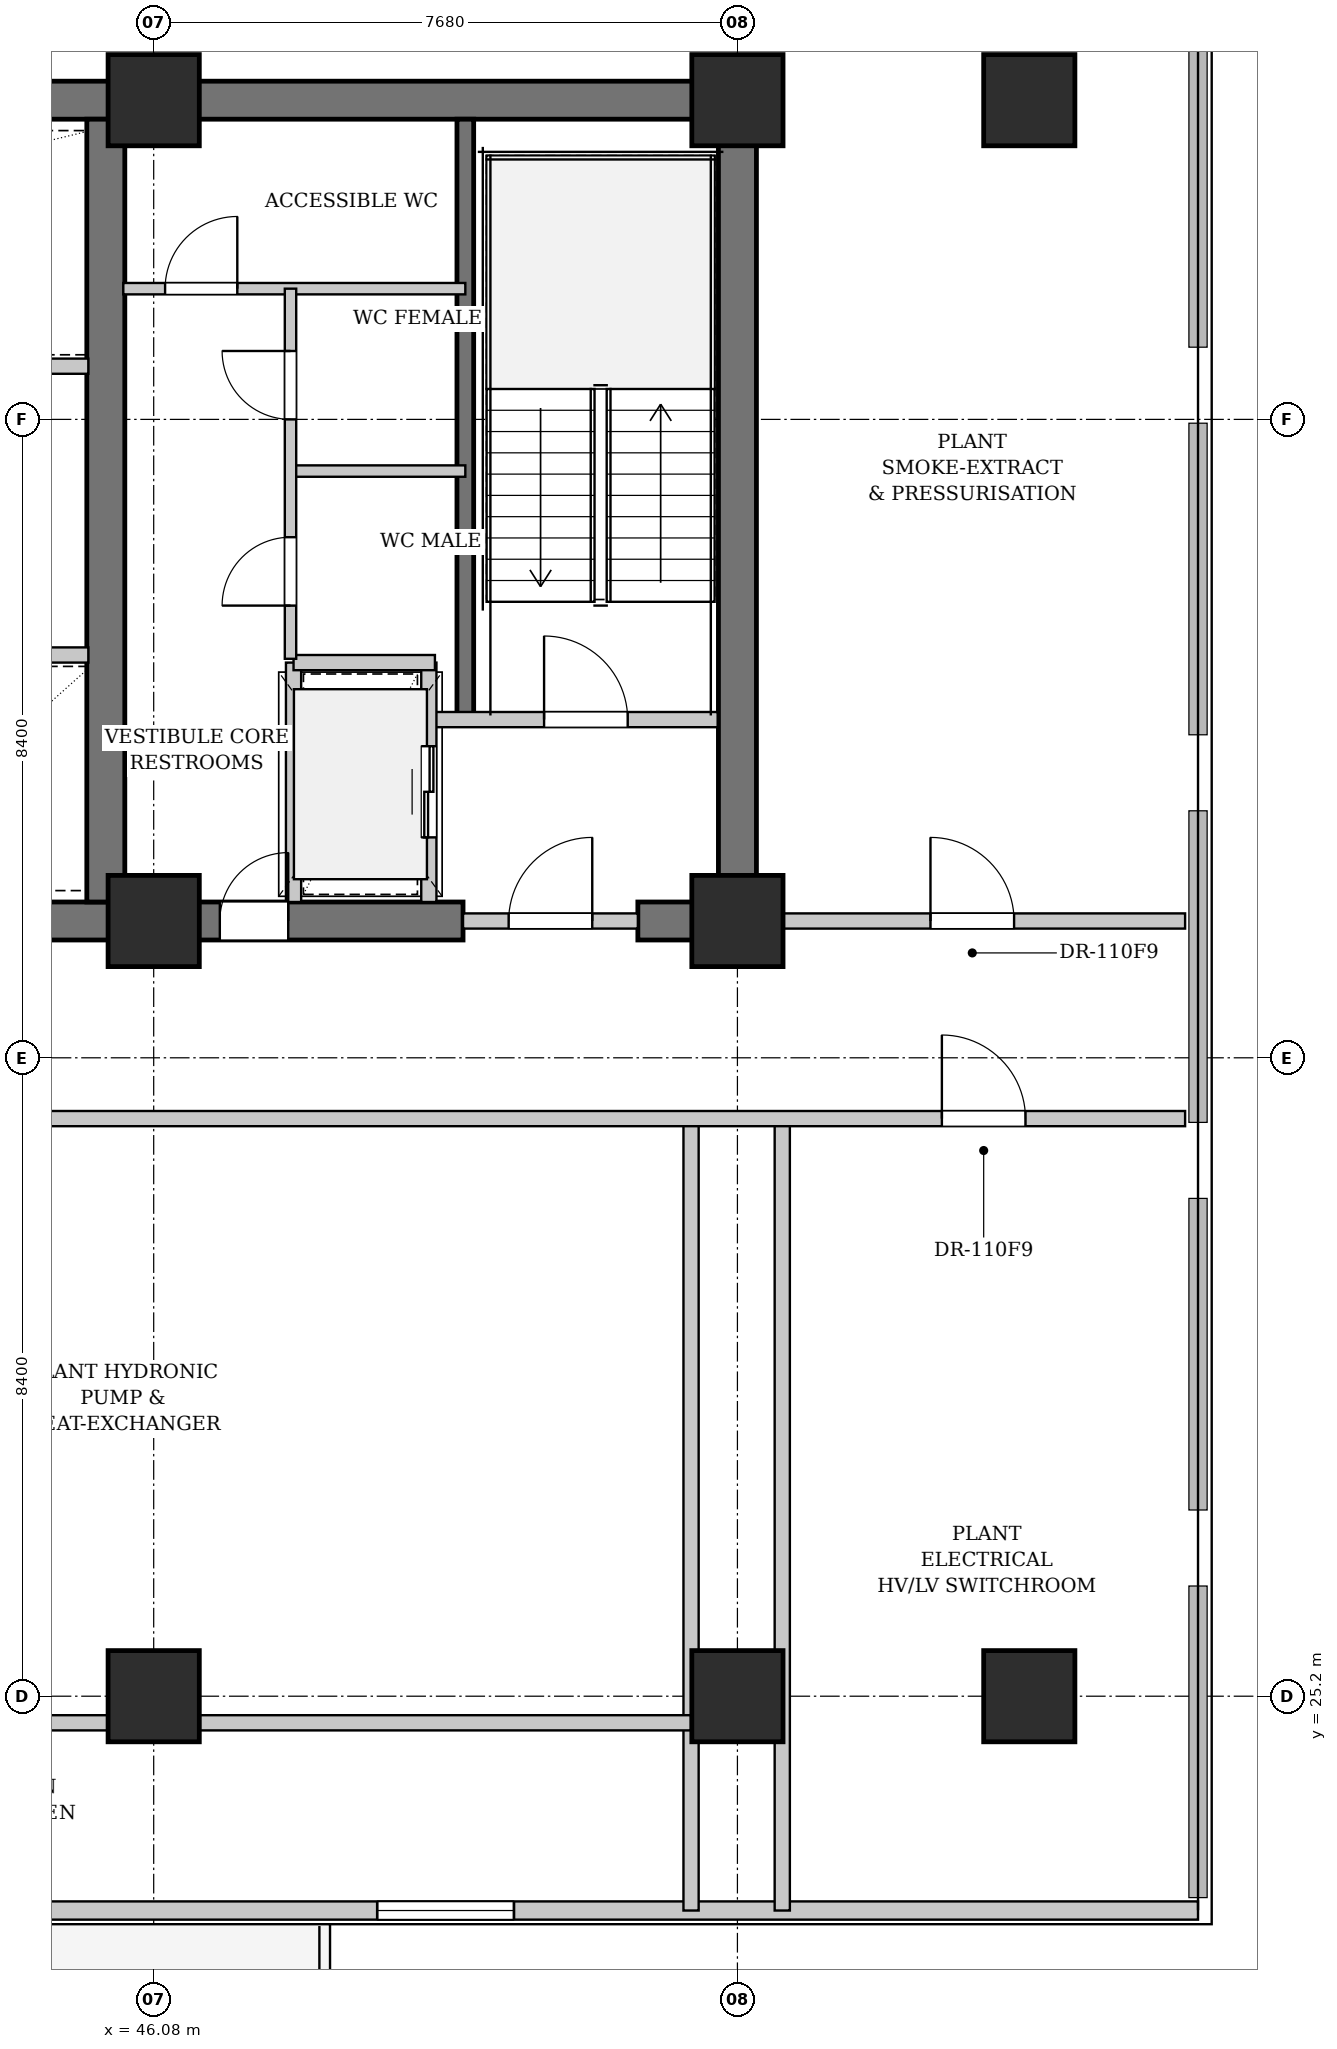
"""IFC4 building model, lengths in metres.
Left out: names, types, materials, properties, quantities, classifications, styles, units other than length and angle.
Written with IfcOpenShell. Run it as: python <this file> out.ifc"""

import sys

from ifc_helpers import new_model, si_unit, direction, frame, frame_2d, origin, origin_2d, place, context, subcontext, project, spatial, rectangle, extrude, element, fill, save


model = new_model("IFC4")
c1 = context("Model", 3, precision=1e-05, world=origin(), true_north=direction((0.0, 1.0)))
c2 = subcontext(c1, "Body", "Model", "MODEL_VIEW")
j1 = project(units=[si_unit("LENGTHUNIT", "METRE"), si_unit("PLANEANGLEUNIT", "RADIAN")], contexts=[c1])
p1 = place(None, origin())
s1 = spatial("IfcSite", under=j1, at=p1, CompositionType="ELEMENT")
p2 = place(p1, origin())
s2 = spatial("IfcBuilding", under=s1, at=p2, CompositionType="ELEMENT")
p3 = place(p2, frame((0.0, 0.0, 78.0)))
s3 = spatial("IfcBuildingStorey", under=s2, at=p3, CompositionType="ELEMENT", Elevation=78.0)
p4 = place(p3, frame((22.79, 46.2, 0.0), z_axis=(0.0, 0.0, 1.0), x_axis=(1.0, 0.0, 0.0)))
e1 = element("IfcWall", 1, at=p4, inside=s3, PredefinedType="SHEAR", context=c2, shape_type="SweptSolid", body=[
    extrude(rectangle(XDim=31.22, YDim=0.5, at=frame_2d((15.61, 0.0))), origin(), (0.0, 0.0, 1.0), 3.68),
])
p5 = place(p3, frame((42.1, 35.4, 0.0), z_axis=(0.0, 0.0, 1.0), x_axis=(1.0, 0.0, 0.0)))
e2 = element("IfcWall", 2, at=p5, inside=s3, PredefinedType="SHEAR", context=c2, shape_type="SweptSolid", body=[
    extrude(rectangle(XDim=8.05, YDim=0.5, at=frame_2d((4.025, 0.0))), origin(), (0.0, 0.0, 1.0), 3.68),
])
p6 = place(p5, frame((4.85, 0.0, 0.0)))
e3 = element("IfcOpeningElement", 3, at=p6, cuts=e2, PredefinedType="OPENING", context=c2, shape_type="SweptSolid", body=[
    extrude(rectangle(XDim=0.9, YDim=2.15, at=frame_2d((0.45, 1.075))), frame((0.0, 0.26, 0.0), z_axis=(0.0, -1.0, 0.0), x_axis=(1.0, 0.0, 0.0)), (0.0, 0.0, 1.0), 0.52),
])
p7 = place(p3, frame((52.45, 35.4, 0.0), z_axis=(0.0, 0.0, 1.0), x_axis=(1.0, 0.0, 0.0)))
e4 = element("IfcWall", 4, at=p7, inside=s3, PredefinedType="SHEAR", context=c2, shape_type="SweptSolid", body=[
    extrude(rectangle(XDim=1.56, YDim=0.5, at=frame_2d((0.78, 0.0))), origin(), (0.0, 0.0, 1.0), 3.68),
])
for number, where, z_axis, x_axis in (
    (5, (45.45, 35.65, 0.0), (0.0, 0.0, 1.0), (0.0, 1.0, 0.0)),
    (6, (53.76, 35.65, 0.0), (0.0, 0.0, 1.0), (0.0, 1.0, 0.0)),
):
    element("IfcWall", number, at=place(p3, frame(where, z_axis=z_axis, x_axis=x_axis)), inside=s3, PredefinedType="SHEAR", context=c2, shape_type="SweptSolid", body=[
        extrude(rectangle(XDim=10.3, YDim=0.5, at=frame_2d((5.15, 0.0))), origin(), (0.0, 0.0, 1.0), 3.68),
    ])
p8 = place(p3, frame((50.18, 38.05, 0.0), z_axis=(0.0, 0.0, 1.0), x_axis=(0.0, 1.0, 0.0)))
e7 = element("IfcWall", 7, at=p8, inside=s3, PredefinedType="SHEAR", context=c2, shape_type="SweptSolid", body=[
    extrude(rectangle(XDim=7.9, YDim=0.22, at=frame_2d((3.95, 0.0))), origin(), (0.0, 0.0, 1.0), 3.68),
])
for number, where, z_axis, x_axis in (
    (8, (46.08, 35.4, 0.0), (0.0, 0.0, 1.0), (1.0, 0.0, 0.0)),
    (9, (46.08, 46.2, 0.0), (0.0, 0.0, 1.0), (1.0, 0.0, 0.0)),
    (10, (46.08, 25.2, 0.0), (0.0, 0.0, 1.0), (1.0, 0.0, 0.0)),
    (11, (53.76, 35.4, 0.0), (0.0, 0.0, 1.0), (1.0, 0.0, 0.0)),
    (12, (53.76, 46.2, 0.0), (0.0, 0.0, 1.0), (1.0, 0.0, 0.0)),
    (13, (53.76, 25.2, 0.0), (0.0, 0.0, 1.0), (1.0, 0.0, 0.0)),
    (14, (57.6, 25.2, 0.0), (0.0, 0.0, 1.0), (1.0, 0.0, 0.0)),
    (15, (57.6, 46.2, 0.0), (0.0, 0.0, 1.0), (1.0, 0.0, 0.0)),
):
    element("IfcColumn", number, at=place(p3, frame(where, z_axis=z_axis, x_axis=x_axis)), inside=s3, PredefinedType="COLUMN", context=c2, shape_type="SweptSolid", body=[
        extrude(rectangle(XDim=1.2, YDim=1.2, at=origin_2d()), origin(), (0.0, 0.0, 1.0), 3.9),
    ])
p9 = place(p3, frame((16.98, 22.38, 0.0), z_axis=(0.0, 0.0, 1.0), x_axis=(1.0, 0.0, 0.0)))
e16 = element("IfcWall", 16, at=p9, inside=s3, PredefinedType="SOLIDWALL", context=c2, shape_type="SweptSolid", body=[
    extrude(rectangle(XDim=42.84, YDim=0.24, at=frame_2d((21.42, 0.0))), origin(), (0.0, 0.0, 1.0), 3.68),
])
p10 = place(p9, frame((16.78, 0.0, 0.0)))
e17 = element("IfcOpeningElement", 17, at=p10, cuts=e16, PredefinedType="OPENING", context=c2, shape_type="SweptSolid", body=[
    extrude(rectangle(XDim=1.6, YDim=2.25, at=frame_2d((0.8, 1.125))), frame((0.0, 0.13, 0.0), z_axis=(0.0, -1.0, 0.0), x_axis=(1.0, 0.0, 0.0)), (0.0, 0.0, 1.0), 0.26),
])
p11 = place(p9, frame((9.0, 0.0, 0.9)))
e18 = element("IfcOpeningElement", 18, at=p11, cuts=e16, PredefinedType="OPENING", context=c2, shape_type="SweptSolid", body=[
    extrude(rectangle(XDim=1.8, YDim=2.0, at=frame_2d((0.9, 1.0))), frame((0.0, 0.13, 0.0), z_axis=(0.0, -1.0, 0.0), x_axis=(1.0, 0.0, 0.0)), (0.0, 0.0, 1.0), 0.26),
])
p12 = place(p9, frame((32.04, 0.0, 0.9)))
e19 = element("IfcOpeningElement", 19, at=p12, cuts=e16, PredefinedType="OPENING", context=c2, shape_type="SweptSolid", body=[
    extrude(rectangle(XDim=1.8, YDim=2.0, at=frame_2d((0.9, 1.0))), frame((0.0, 0.13, 0.0), z_axis=(0.0, -1.0, 0.0), x_axis=(1.0, 0.0, 0.0)), (0.0, 0.0, 1.0), 0.26),
])
for number, where, z_axis, x_axis in (
    (20, (41.85, 38.9, 0.0), (0.0, 0.0, 1.0), (1.0, 0.0, 0.0)),
    (21, (41.85, 42.7, 0.0), (0.0, 0.0, 1.0), (1.0, 0.0, 0.0)),
):
    element("IfcWall", number, at=place(p3, frame(where, z_axis=z_axis, x_axis=x_axis)), inside=s3, PredefinedType="PARTITIONING", context=c2, shape_type="SweptSolid", body=[
        extrude(rectangle(XDim=3.37, YDim=0.2, at=frame_2d((1.685, 0.0))), origin(), (0.0, 0.0, 1.0), 3.68),
    ])
p13 = place(p3, frame((49.78, 38.05, 0.0), z_axis=(0.0, 0.0, 1.0), x_axis=(1.0, 0.0, 0.0)))
e22 = element("IfcWall", 22, at=p13, inside=s3, PredefinedType="PARTITIONING", context=c2, shape_type="SweptSolid", body=[
    extrude(rectangle(XDim=3.72, YDim=0.2, at=frame_2d((1.86, 0.0))), origin(), (0.0, 0.0, 1.0), 3.68),
])
p14 = place(p13, frame((1.436, 0.0, 0.0)))
e23 = element("IfcOpeningElement", 23, at=p14, cuts=e22, PredefinedType="OPENING", context=c2, shape_type="SweptSolid", body=[
    extrude(rectangle(XDim=1.1, YDim=2.15, at=frame_2d((0.55, 1.075))), frame((0.0, 0.11, 0.0), z_axis=(0.0, -1.0, 0.0), x_axis=(1.0, 0.0, 0.0)), (0.0, 0.0, 1.0), 0.22),
])
p15 = place(p3, frame((50.15, 35.4, 0.0), z_axis=(0.0, 0.0, 1.0), x_axis=(1.0, 0.0, 0.0)))
e24 = element("IfcWall", 24, at=p15, inside=s3, PredefinedType="PARTITIONING", context=c2, shape_type="SweptSolid", body=[
    extrude(rectangle(XDim=2.3, YDim=0.2, at=frame_2d((1.15, 0.0))), origin(), (0.0, 0.0, 1.0), 2.765),
])
p16 = place(p15, frame((0.6, 0.0, 0.0)))
e25 = element("IfcOpeningElement", 25, at=p16, cuts=e24, PredefinedType="OPENING", context=c2, shape_type="SweptSolid", body=[
    extrude(rectangle(XDim=1.1, YDim=2.15, at=frame_2d((0.55, 1.075))), frame((0.0, 0.11, 0.0), z_axis=(0.0, -1.0, 0.0), x_axis=(1.0, 0.0, 0.0)), (0.0, 0.0, 1.0), 0.22),
])
p17 = place(p3, frame((49.7, 35.65, 0.0), z_axis=(0.0, 0.0, 1.0), x_axis=(0.0, 1.0, 0.0)))
e26 = element("IfcWall", 26, at=p17, inside=s3, PredefinedType="PARTITIONING", context=c2, shape_type="SweptSolid", body=[
    extrude(rectangle(XDim=3.15, YDim=0.2, at=frame_2d((1.575, 0.0))), origin(), (0.0, 0.0, 1.0), 3.68),
])
p18 = place(p17, frame((0.85, 0.0, 0.0)))
e27 = element("IfcOpeningElement", 27, at=p18, cuts=e26, PredefinedType="OPENING", context=c2, shape_type="SweptSolid", body=[
    extrude(rectangle(XDim=1.2, YDim=2.2, at=frame_2d((0.6, 1.1))), frame((0.0, 0.11, 0.0), z_axis=(0.0, -1.0, 0.0), x_axis=(1.0, 0.0, 0.0)), (0.0, 0.0, 1.0), 0.22),
])
p19 = place(p3, frame((47.92, 35.65, 0.0), z_axis=(0.0, 0.0, 1.0), x_axis=(0.0, 1.0, 0.0)))
e28 = element("IfcWall", 28, at=p19, inside=s3, PredefinedType="PARTITIONING", context=c2, shape_type="SweptSolid", body=[
    extrude(rectangle(XDim=3.15, YDim=0.2, at=frame_2d((1.575, 0.0))), origin(), (0.0, 0.0, 1.0), 3.68),
])
p20 = place(p3, frame((47.92, 38.8, 0.0), z_axis=(0.0, 0.0, 1.0), x_axis=(1.0, 0.0, 0.0)))
e29 = element("IfcWall", 29, at=p20, inside=s3, PredefinedType="PARTITIONING", context=c2, shape_type="SweptSolid", body=[
    extrude(rectangle(XDim=1.86, YDim=0.2, at=frame_2d((0.93, 0.0))), origin(), (0.0, 0.0, 1.0), 3.68),
])
p21 = place(p3, frame((45.68, 43.72, 0.0), z_axis=(0.0, 0.0, 1.0), x_axis=(1.0, 0.0, 0.0)))
e30 = element("IfcWall", 30, at=p21, inside=s3, PredefinedType="PARTITIONING", context=c2, shape_type="SweptSolid", body=[
    extrude(rectangle(XDim=4.5, YDim=0.15, at=frame_2d((2.25, 0.0))), origin(), (0.0, 0.0, 1.0), 3.68),
])
p22 = place(p21, frame((0.55, 0.0, 0.0)))
e31 = element("IfcOpeningElement", 31, at=p22, cuts=e30, PredefinedType="OPENING", context=c2, shape_type="SweptSolid", body=[
    extrude(rectangle(XDim=0.95, YDim=2.15, at=frame_2d((0.475, 1.075))), frame((0.0, 0.085, 0.0), z_axis=(0.0, -1.0, 0.0), x_axis=(1.0, 0.0, 0.0)), (0.0, 0.0, 1.0), 0.17),
])
p23 = place(p3, frame((47.88, 41.32, 0.0), z_axis=(0.0, 0.0, 1.0), x_axis=(1.0, 0.0, 0.0)))
e32 = element("IfcWall", 32, at=p23, inside=s3, PredefinedType="PARTITIONING", context=c2, shape_type="SweptSolid", body=[
    extrude(rectangle(XDim=2.3, YDim=0.15, at=frame_2d((1.15, 0.0))), origin(), (0.0, 0.0, 1.0), 3.68),
])
p24 = place(p3, frame((47.88, 38.85, 0.0), z_axis=(0.0, 0.0, 1.0), x_axis=(0.0, 1.0, 0.0)))
e33 = element("IfcWall", 33, at=p24, inside=s3, PredefinedType="PARTITIONING", context=c2, shape_type="SweptSolid", body=[
    extrude(rectangle(XDim=4.87, YDim=0.15, at=frame_2d((2.435, 0.0))), origin(), (0.0, 0.0, 1.0), 3.68),
])
p25 = place(p24, frame((0.7, 0.0, 0.0)))
e34 = element("IfcOpeningElement", 34, at=p25, cuts=e33, PredefinedType="OPENING", context=c2, shape_type="SweptSolid", body=[
    extrude(rectangle(XDim=0.9, YDim=2.15, at=frame_2d((0.45, 1.075))), frame((0.0, 0.085, 0.0), z_axis=(0.0, -1.0, 0.0), x_axis=(1.0, 0.0, 0.0)), (0.0, 0.0, 1.0), 0.17),
])
p26 = place(p24, frame((3.15, 0.0, 0.0)))
e35 = element("IfcOpeningElement", 35, at=p26, cuts=e33, PredefinedType="OPENING", context=c2, shape_type="SweptSolid", body=[
    extrude(rectangle(XDim=0.9, YDim=2.15, at=frame_2d((0.45, 1.075))), frame((0.0, 0.085, 0.0), z_axis=(0.0, -1.0, 0.0), x_axis=(1.0, 0.0, 0.0)), (0.0, 0.0, 1.0), 0.17),
])
p27 = place(p3, frame((54.05, 35.4, 0.0), z_axis=(0.0, 0.0, 1.0), x_axis=(1.0, 0.0, 0.0)))
e36 = element("IfcWall", 36, at=p27, inside=s3, PredefinedType="PARTITIONING", context=c2, shape_type="SweptSolid", body=[
    extrude(rectangle(XDim=5.6, YDim=0.2, at=frame_2d((2.8, 0.0))), origin(), (0.0, 0.0, 1.0), 3.68),
])
p28 = place(p27, frame((2.25, 0.0, 0.0)))
e37 = element("IfcOpeningElement", 37, at=p28, cuts=e36, PredefinedType="OPENING", context=c2, shape_type="SweptSolid", body=[
    extrude(rectangle(XDim=1.1, YDim=2.15, at=frame_2d((0.55, 1.075))), frame((0.0, 0.11, 0.0), z_axis=(0.0, -1.0, 0.0), x_axis=(1.0, 0.0, 0.0)), (0.0, 0.0, 1.0), 0.22),
])
for number, where, z_axis, x_axis in (
    (38, (53.15, 22.38, 0.0), (0.0, 0.0, 1.0), (0.0, 1.0, 0.0)),
    (39, (54.35, 22.38, 0.0), (0.0, 0.0, 1.0), (0.0, 1.0, 0.0)),
):
    element("IfcWall", number, at=place(p3, frame(where, z_axis=z_axis, x_axis=x_axis)), inside=s3, PredefinedType="PARTITIONING", context=c2, shape_type="SweptSolid", body=[
        extrude(rectangle(XDim=10.42, YDim=0.2, at=frame_2d((5.21, 0.0))), origin(), (0.0, 0.0, 1.0), 3.68),
    ])
p29 = place(p3, frame((23.65, 24.85, 0.0), z_axis=(0.0, 0.0, 1.0), x_axis=(1.0, 0.0, 0.0)))
e40 = element("IfcWall", 40, at=p29, inside=s3, PredefinedType="PARTITIONING", context=c2, shape_type="SweptSolid", body=[
    extrude(rectangle(XDim=29.5, YDim=0.2, at=frame_2d((14.75, 0.0))), origin(), (0.0, 0.0, 1.0), 3.68),
])
p30 = place(p29, frame((9.7, 0.0, 0.0)))
e41 = element("IfcOpeningElement", 41, at=p30, cuts=e40, PredefinedType="OPENING", context=c2, shape_type="SweptSolid", body=[
    extrude(rectangle(XDim=1.1, YDim=2.15, at=frame_2d((0.55, 1.075))), frame((0.0, 0.11, 0.0), z_axis=(0.0, -1.0, 0.0), x_axis=(1.0, 0.0, 0.0)), (0.0, 0.0, 1.0), 0.22),
])
p31 = place(p3, frame((17.15, 32.8, 0.0), z_axis=(0.0, 0.0, 1.0), x_axis=(1.0, 0.0, 0.0)))
e42 = element("IfcWall", 42, at=p31, inside=s3, PredefinedType="PARTITIONING", context=c2, shape_type="SweptSolid", body=[
    extrude(rectangle(XDim=42.5, YDim=0.2, at=frame_2d((21.25, 0.0))), origin(), (0.0, 0.0, 1.0), 3.68),
])
p32 = place(p31, frame((2.1, 0.0, 0.0)))
e43 = element("IfcOpeningElement", 43, at=p32, cuts=e42, PredefinedType="OPENING", context=c2, shape_type="SweptSolid", body=[
    extrude(rectangle(XDim=1.1, YDim=2.15, at=frame_2d((0.55, 1.075))), frame((0.0, 0.11, 0.0), z_axis=(0.0, -1.0, 0.0), x_axis=(1.0, 0.0, 0.0)), (0.0, 0.0, 1.0), 0.22),
])
p33 = place(p31, frame((9.18, 0.0, 0.0)))
e44 = element("IfcOpeningElement", 44, at=p33, cuts=e42, PredefinedType="OPENING", context=c2, shape_type="SweptSolid", body=[
    extrude(rectangle(XDim=1.1, YDim=2.15, at=frame_2d((0.55, 1.075))), frame((0.0, 0.11, 0.0), z_axis=(0.0, -1.0, 0.0), x_axis=(1.0, 0.0, 0.0)), (0.0, 0.0, 1.0), 0.22),
])
p34 = place(p31, frame((16.2, 0.0, 0.0)))
e45 = element("IfcOpeningElement", 45, at=p34, cuts=e42, PredefinedType="OPENING", context=c2, shape_type="SweptSolid", body=[
    extrude(rectangle(XDim=1.1, YDim=2.15, at=frame_2d((0.55, 1.075))), frame((0.0, 0.11, 0.0), z_axis=(0.0, -1.0, 0.0), x_axis=(1.0, 0.0, 0.0)), (0.0, 0.0, 1.0), 0.22),
])
p35 = place(p31, frame((24.54, 0.0, 0.0)))
e46 = element("IfcOpeningElement", 46, at=p35, cuts=e42, PredefinedType="OPENING", context=c2, shape_type="SweptSolid", body=[
    extrude(rectangle(XDim=1.1, YDim=2.15, at=frame_2d((0.55, 1.075))), frame((0.0, 0.11, 0.0), z_axis=(0.0, -1.0, 0.0), x_axis=(1.0, 0.0, 0.0)), (0.0, 0.0, 1.0), 0.22),
])
p36 = place(p31, frame((39.3, 0.0, 0.0)))
e47 = element("IfcOpeningElement", 47, at=p36, cuts=e42, PredefinedType="OPENING", context=c2, shape_type="SweptSolid", body=[
    extrude(rectangle(XDim=1.1, YDim=2.15, at=frame_2d((0.55, 1.075))), frame((0.0, 0.11, 0.0), z_axis=(0.0, -1.0, 0.0), x_axis=(1.0, 0.0, 0.0)), (0.0, 0.0, 1.0), 0.22),
])
p37 = place(p12, origin())
e48 = element("IfcWindow", 48, at=p37, inside=s3, PartitioningType="SINGLE_PANEL", PredefinedType="WINDOW", context=c2, shape_type="SweptSolid", body=[
    extrude(rectangle(XDim=1.8, YDim=2.0, at=frame_2d((0.9, 1.0))), frame((0.0, 0.03, 0.0), z_axis=(0.0, -1.0, 0.0), x_axis=(1.0, 0.0, 0.0)), (0.0, 0.0, 1.0), 0.06),
])
fill(e19, e48)
p38 = place(p14, origin())
e49 = element("IfcDoor", 49, at=p38, inside=s3, OperationType="SINGLE_SWING_LEFT", PredefinedType="DOOR", context=c2, shape_type="SweptSolid", body=[
    extrude(rectangle(XDim=1.1, YDim=2.15, at=frame_2d((0.55, 1.075))), frame((0.0, 0.025, 0.0), z_axis=(0.0, -1.0, 0.0), x_axis=(1.0, 0.0, 0.0)), (0.0, 0.0, 1.0), 0.05),
])
fill(e23, e49)
p39 = place(p16, origin())
e50 = element("IfcDoor", 50, at=p39, inside=s3, OperationType="SINGLE_SWING_RIGHT", PredefinedType="DOOR", context=c2, shape_type="SweptSolid", body=[
    extrude(rectangle(XDim=1.1, YDim=2.15, at=frame_2d((0.55, 1.075))), frame((0.0, 0.025, 0.0), z_axis=(0.0, -1.0, 0.0), x_axis=(1.0, 0.0, 0.0)), (0.0, 0.0, 1.0), 0.05),
])
fill(e25, e50)
p40 = place(p18, origin())
e51 = element("IfcDoor", 51, at=p40, inside=s3, OperationType="DOUBLE_DOOR_SLIDING", PredefinedType="DOOR", context=c2, shape_type="SweptSolid", body=[
    extrude(rectangle(XDim=1.2, YDim=2.2, at=frame_2d((0.6, 1.1))), frame((0.0, 0.025, 0.0), z_axis=(0.0, -1.0, 0.0), x_axis=(1.0, 0.0, 0.0)), (0.0, 0.0, 1.0), 0.05),
])
fill(e27, e51)
p41 = place(p22, origin())
e52 = element("IfcDoor", 52, at=p41, inside=s3, OperationType="SINGLE_SWING_RIGHT", PredefinedType="DOOR", context=c2, shape_type="SweptSolid", body=[
    extrude(rectangle(XDim=0.95, YDim=2.15, at=frame_2d((0.475, 1.075))), frame((0.0, 0.025, 0.0), z_axis=(0.0, -1.0, 0.0), x_axis=(1.0, 0.0, 0.0)), (0.0, 0.0, 1.0), 0.05),
])
fill(e31, e52)
p42 = place(p25, origin())
e53 = element("IfcDoor", 53, at=p42, inside=s3, OperationType="SINGLE_SWING_LEFT", PredefinedType="DOOR", context=c2, shape_type="SweptSolid", body=[
    extrude(rectangle(XDim=0.9, YDim=2.15, at=frame_2d((0.45, 1.075))), frame((0.0, 0.025, 0.0), z_axis=(0.0, -1.0, 0.0), x_axis=(1.0, 0.0, 0.0)), (0.0, 0.0, 1.0), 0.05),
])
fill(e34, e53)
p43 = place(p26, origin())
e54 = element("IfcDoor", 54, at=p43, inside=s3, OperationType="SINGLE_SWING_RIGHT", PredefinedType="DOOR", context=c2, shape_type="SweptSolid", body=[
    extrude(rectangle(XDim=0.9, YDim=2.15, at=frame_2d((0.45, 1.075))), frame((0.0, 0.025, 0.0), z_axis=(0.0, -1.0, 0.0), x_axis=(1.0, 0.0, 0.0)), (0.0, 0.0, 1.0), 0.05),
])
fill(e35, e54)
p44 = place(p28, origin())
e55 = element("IfcDoor", 55, at=p44, inside=s3, OperationType="SINGLE_SWING_LEFT", PredefinedType="DOOR", context=c2, shape_type="SweptSolid", body=[
    extrude(rectangle(XDim=1.1, YDim=2.15, at=frame_2d((0.55, 1.075))), frame((0.0, 0.025, 0.0), z_axis=(0.0, -1.0, 0.0), x_axis=(1.0, 0.0, 0.0)), (0.0, 0.0, 1.0), 0.05),
])
fill(e37, e55)
p45 = place(p36, origin())
e56 = element("IfcDoor", 56, at=p45, inside=s3, OperationType="SINGLE_SWING_LEFT", PredefinedType="DOOR", context=c2, shape_type="SweptSolid", body=[
    extrude(rectangle(XDim=1.1, YDim=2.15, at=frame_2d((0.55, 1.075))), frame((0.0, 0.025, 0.0), z_axis=(0.0, -1.0, 0.0), x_axis=(1.0, 0.0, 0.0)), (0.0, 0.0, 1.0), 0.05),
])
fill(e47, e56)
p46 = place(p6, origin())
e57 = element("IfcDoor", 57, at=p46, inside=s3, OperationType="SINGLE_SWING_RIGHT", PredefinedType="DOOR", context=c2, shape_type="SweptSolid", body=[
    extrude(rectangle(XDim=0.9, YDim=2.15, at=frame_2d((0.45, 1.075))), frame((0.0, 0.025, 0.0), z_axis=(0.0, -1.0, 0.0), x_axis=(1.0, 0.0, 0.0)), (0.0, 0.0, 1.0), 0.05),
])
fill(e3, e57)
save(model, sys.argv[1])
